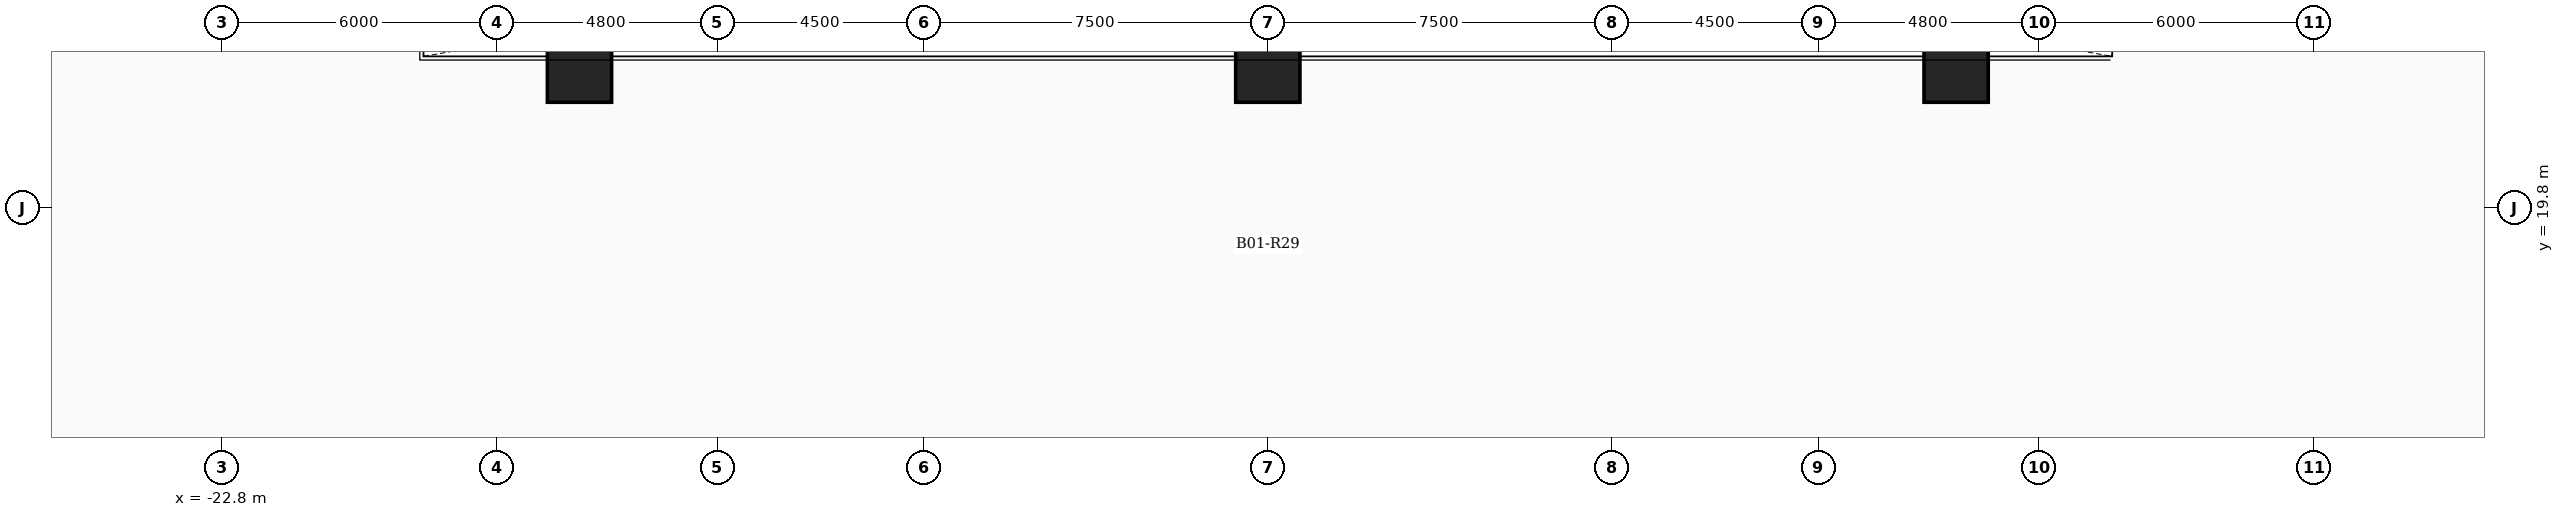
"""IFC4 building model, lengths in metres.
Left out: names, types, materials, properties, quantities, classifications, styles, units other than length and angle.
Written with IfcOpenShell. Run it as: python <this file> out.ifc"""

import sys

from ifc_helpers import new_model, si_unit, direction, frame, origin, origin_2d, place, context, subcontext, project, spatial, rectangle, extrude, element, save


model = new_model("IFC4")
c1 = context("Model", 3, precision=1e-05, world=origin(), true_north=direction((0.0, 1.0)))
c2 = subcontext(c1, "Body", "Model", "MODEL_VIEW")
j1 = project(units=[si_unit("LENGTHUNIT", "METRE"), si_unit("PLANEANGLEUNIT", "RADIAN")], contexts=[c1])
p1 = place(None, origin())
s1 = spatial("IfcSite", under=j1, at=p1, CompositionType="ELEMENT")
p2 = place(p1, origin())
s2 = spatial("IfcBuilding", under=s1, at=p2, CompositionType="ELEMENT")
p3 = place(p2, frame((0.0, 0.0, -4.6)))
s3 = spatial("IfcBuildingStorey", under=s2, at=p3, CompositionType="ELEMENT", Elevation=-4.6)
for number, where, z_axis, x_axis in (
    (1, (-15.0, 22.8, 0.0), (0.0, 0.0, 1.0), (1.0, 0.0, 0.0)),
    (2, (0.0, 22.8, 0.0), (0.0, 0.0, 1.0), (1.0, 0.0, 0.0)),
    (3, (15.0, 22.8, 0.0), (0.0, 0.0, 1.0), (1.0, 0.0, 0.0)),
):
    element("IfcColumn", number, at=place(p3, frame(where, z_axis=z_axis, x_axis=x_axis)), inside=s3, PredefinedType="COLUMN", context=c2, shape_type="SweptSolid", body=[
        extrude(rectangle(XDim=1.4, YDim=1.4, at=origin_2d()), origin(), (0.0, 0.0, 1.0), 4.6),
    ])
save(model, sys.argv[1])
